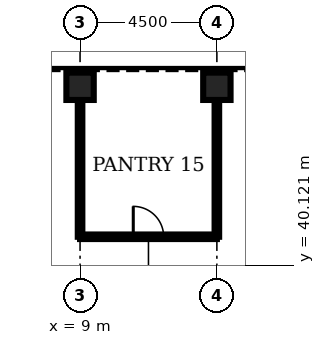
"""IFC4 building model, lengths in metres.
Left out: names, types, materials, properties, quantities, classifications, styles, units other than length and angle.
Written with IfcOpenShell. Run it as: python <this file> out.ifc"""

import sys

from ifc_helpers import new_model, si_unit, direction, frame, frame_2d, origin, origin_2d, place, context, subcontext, project, spatial, rectangle, hollow_rectangle, extrude, element, fill, save


model = new_model("IFC4")
c1 = context("Model", 3, precision=1e-05, world=origin(), true_north=direction((0.0, 1.0)))
c2 = subcontext(c1, "Body", "Model", "MODEL_VIEW")
j1 = project(units=[si_unit("LENGTHUNIT", "METRE"), si_unit("PLANEANGLEUNIT", "RADIAN")], contexts=[c1])
p1 = place(None, origin())
s1 = spatial("IfcSite", under=j1, at=p1, CompositionType="ELEMENT")
p2 = place(p1, origin())
s2 = spatial("IfcBuilding", under=s1, at=p2, CompositionType="ELEMENT")
p3 = place(p2, frame((0.0, 0.0, 72.5)))
s3 = spatial("IfcBuildingStorey", under=s2, at=p3, CompositionType="ELEMENT", Elevation=72.5)
for number, where, z_axis, x_axis in (
    (1, (13.5, 46.0, 0.0), (0.0, 0.0, 1.0), (0.0, 1.0, 0.0)),
    (2, (9.0, 46.0, 0.0), (0.0, 0.0, 1.0), (0.0, 1.0, 0.0)),
):
    element("IfcColumn", number, at=place(p3, frame(where, z_axis=z_axis, x_axis=x_axis)), inside=s3, PredefinedType="COLUMN", context=c2, shape_type="SweptSolid", body=[
        extrude(hollow_rectangle(XDim=0.9, YDim=0.9, WallThickness=0.12, at=origin_2d()), origin(), (0.0, 0.0, 1.0), 4.5),
    ])
p4 = place(p3, frame((9.0, 41.05, 0.0), z_axis=(0.0, 0.0, 1.0), x_axis=(1.0, 0.0, 0.0)))
e3 = element("IfcWall", 3, at=p4, inside=s3, PredefinedType="PARTITIONING", context=c2, shape_type="SweptSolid", body=[
    extrude(rectangle(XDim=4.5, YDim=0.15, at=frame_2d((2.25, 0.0))), origin(), (0.0, 0.0, 1.0), 3.0),
])
p5 = place(p4, frame((1.75, 0.0, 0.0)))
e4 = element("IfcOpeningElement", 4, at=p5, cuts=e3, PredefinedType="OPENING", context=c2, shape_type="SweptSolid", body=[
    extrude(rectangle(XDim=1.0, YDim=2.1, at=frame_2d((0.5, 1.05))), frame((0.0, 0.085, 0.0), z_axis=(0.0, -1.0, 0.0), x_axis=(1.0, 0.0, 0.0)), (0.0, 0.0, 1.0), 0.17),
])
for number, where, z_axis, x_axis in (
    (5, (9.0, 41.05, 0.0), (0.0, 0.0, 1.0), (0.0, 1.0, 0.0)),
    (6, (13.5, 41.05, 0.0), (0.0, 0.0, 1.0), (0.0, 1.0, 0.0)),
):
    element("IfcWall", number, at=place(p3, frame(where, z_axis=z_axis, x_axis=x_axis)), inside=s3, PredefinedType="PARTITIONING", context=c2, shape_type="SweptSolid", body=[
        extrude(rectangle(XDim=4.5, YDim=0.15, at=frame_2d((2.25, 0.0))), origin(), (0.0, 0.0, 1.0), 3.0),
    ])
p6 = place(p5, origin())
e7 = element("IfcDoor", 7, at=p6, inside=s3, OperationType="SINGLE_SWING_LEFT", PredefinedType="DOOR", context=c2, shape_type="SweptSolid", body=[
    extrude(rectangle(XDim=1.0, YDim=2.1, at=frame_2d((0.5, 1.05))), frame((0.0, 0.025, 0.0), z_axis=(0.0, -1.0, 0.0), x_axis=(1.0, 0.0, 0.0)), (0.0, 0.0, 1.0), 0.05),
])
fill(e4, e7)
save(model, sys.argv[1])
